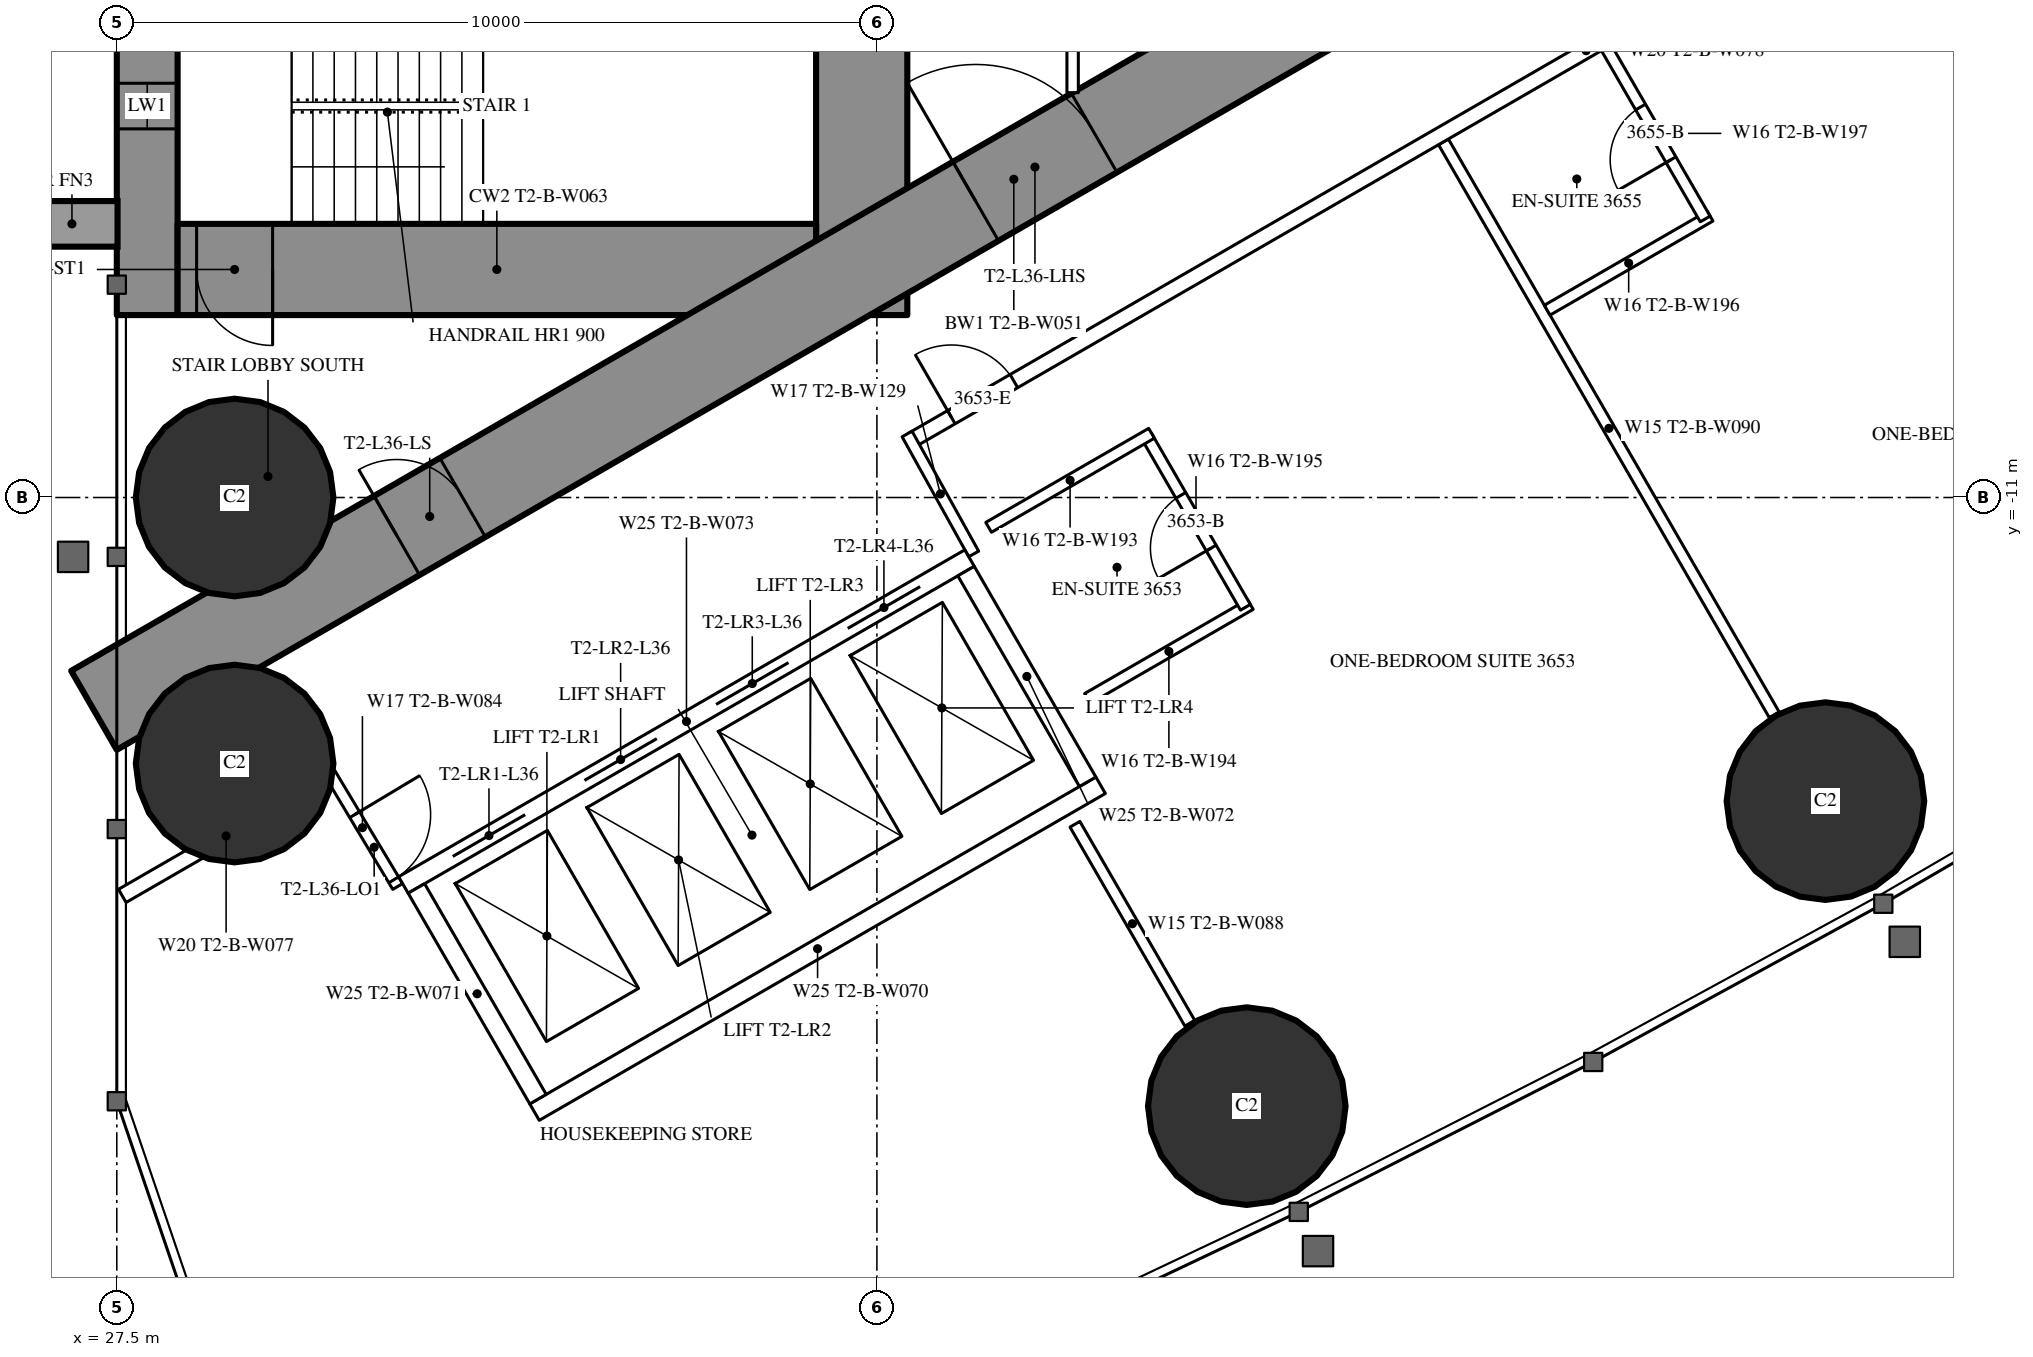
"""IFC4 building model, lengths in metres.
Left out: names, types, materials, properties, quantities, classifications, styles, units other than length and angle.
Written with IfcOpenShell. Run it as: python <this file> out.ifc"""

import sys

from ifc_helpers import new_model, si_unit, direction, frame, frame_2d, origin, origin_2d, place, context, subcontext, project, spatial, rectangle, hollow_circle, extrude, element, fill, save


model = new_model("IFC4")
c1 = context("Model", 3, precision=1e-05, world=origin(), true_north=direction((0.0, 1.0)))
c2 = subcontext(c1, "Body", "Model", "MODEL_VIEW")
j1 = project(units=[si_unit("LENGTHUNIT", "METRE"), si_unit("PLANEANGLEUNIT", "RADIAN")], contexts=[c1])
p1 = place(None, origin())
s1 = spatial("IfcSite", under=j1, at=p1, CompositionType="ELEMENT")
p2 = place(p1, origin())
s2 = spatial("IfcBuilding", under=s1, at=p2, CompositionType="ELEMENT")
p3 = place(p2, frame((0.0, 0.0, 136.1)))
s3 = spatial("IfcBuildingStorey", under=s2, at=p3, CompositionType="ELEMENT", Elevation=136.1)
for number, where, z_axis, x_axis in (
    (1, (29.05, -11.0, 0.0), (0.0, 0.0, 1.0), (1.0, 0.0, 0.0)),
    (2, (29.05, -14.5, 0.0), (0.0, 0.0, 1.0), (1.0, 0.0, 0.0)),
    (3, (42.366, -19.007, 0.0), (0.0, 0.0, 1.0), (1.0, 0.0, 0.0)),
    (4, (49.979, -14.994, 0.0), (0.0, 0.0, 1.0), (1.0, 0.0, 0.0)),
):
    element("IfcColumn", number, at=place(p3, frame(where, z_axis=z_axis, x_axis=x_axis)), inside=s3, PredefinedType="COLUMN", context=c2, shape_type="SweptSolid", body=[
        extrude(hollow_circle(Radius=1.3, WallThickness=0.1, at=origin_2d()), origin(), (0.0, 0.0, 1.0), 3.5),
    ])
p4 = place(p3, frame((27.9, -8.6, 0.0), z_axis=(0.0, 0.0, 1.0), x_axis=(0.0, 1.0, 0.0)))
e5 = element("IfcWall", 5, at=p4, inside=s3, PredefinedType="SHEAR", context=c2, shape_type="SweptSolid", body=[
    extrude(rectangle(XDim=17.2, YDim=0.8, at=frame_2d((8.6, 0.0))), origin(), (0.0, 0.0, 1.0), 3.5),
])
p5 = place(p4, frame((2.45, 0.0, 0.6)))
e6 = element("IfcOpeningElement", 6, at=p5, cuts=e5, PredefinedType="OPENING", context=c2, shape_type="SweptSolid", body=[
    extrude(rectangle(XDim=0.6, YDim=2.1, at=frame_2d((0.3, 1.05))), frame((0.0, 0.41, 0.0), z_axis=(0.0, -1.0, 0.0), x_axis=(1.0, 0.0, 0.0)), (0.0, 0.0, 1.0), 0.82),
])
p6 = place(p4, frame((14.15, 0.0, 0.6)))
e7 = element("IfcOpeningElement", 7, at=p6, cuts=e5, PredefinedType="OPENING", context=c2, shape_type="SweptSolid", body=[
    extrude(rectangle(XDim=0.6, YDim=2.1, at=frame_2d((0.3, 1.05))), frame((0.0, 0.41, 0.0), z_axis=(0.0, -1.0, 0.0), x_axis=(1.0, 0.0, 0.0)), (0.0, 0.0, 1.0), 0.82),
])
p7 = place(p3, frame((37.3, -8.6, 0.0), z_axis=(0.0, 0.0, 1.0), x_axis=(0.0, 1.0, 0.0)))
e8 = element("IfcWall", 8, at=p7, inside=s3, PredefinedType="SHEAR", context=c2, shape_type="SweptSolid", body=[
    extrude(rectangle(XDim=17.2, YDim=1.2, at=frame_2d((8.6, 0.0))), origin(), (0.0, 0.0, 1.0), 3.5),
])
p8 = place(p7, frame((7.7, 0.0, 0.0)))
e9 = element("IfcOpeningElement", 9, at=p8, cuts=e8, PredefinedType="OPENING", context=c2, shape_type="SweptSolid", body=[
    extrude(rectangle(XDim=1.8, YDim=2.2, at=frame_2d((0.9, 1.1))), frame((0.0, 0.61, 0.0), z_axis=(0.0, -1.0, 0.0), x_axis=(1.0, 0.0, 0.0)), (0.0, 0.0, 1.0), 1.22),
])
p9 = place(p3, frame((28.3, -8.0, 0.0), z_axis=(0.0, 0.0, 1.0), x_axis=(1.0, 0.0, 0.0)))
e10 = element("IfcWall", 10, at=p9, inside=s3, PredefinedType="SHEAR", context=c2, shape_type="SweptSolid", body=[
    extrude(rectangle(XDim=8.4, YDim=1.2, at=frame_2d((4.2, 0.0))), origin(), (0.0, 0.0, 1.0), 3.5),
])
p10 = place(p9, frame((0.25, 0.0, 0.0)))
e11 = element("IfcOpeningElement", 11, at=p10, cuts=e10, PredefinedType="OPENING", context=c2, shape_type="SweptSolid", body=[
    extrude(rectangle(XDim=1.0, YDim=2.2, at=frame_2d((0.5, 1.1))), frame((0.0, 0.61, 0.0), z_axis=(0.0, -1.0, 0.0), x_axis=(1.0, 0.0, 0.0)), (0.0, 0.0, 1.0), 1.22),
])
p11 = place(p3, frame((27.2, -13.8, 0.0), z_axis=(0.0, 0.0, 1.0), x_axis=(0.866027159892, 0.499996958321, 0.0)))
e12 = element("IfcWall", 12, at=p11, inside=s3, PredefinedType="SHEAR", context=c2, shape_type="SweptSolid", body=[
    extrude(rectangle(XDim=27.947, YDim=1.2, at=frame_2d((13.973, 0.0))), origin(), (0.0, 0.0, 1.0), 3.5),
])
p12 = place(p11, frame((4.6, 0.0, 0.0)))
e13 = element("IfcOpeningElement", 13, at=p12, cuts=e12, PredefinedType="OPENING", context=c2, shape_type="SweptSolid", body=[
    extrude(rectangle(XDim=1.0, YDim=2.2, at=frame_2d((0.5, 1.1))), frame((0.0, 0.61, 0.0), z_axis=(0.0, -1.0, 0.0), x_axis=(1.0, 0.0, 0.0)), (0.0, 0.0, 1.0), 1.22),
])
p13 = place(p11, frame((13.395, 0.0, 0.0)))
e14 = element("IfcOpeningElement", 14, at=p13, cuts=e12, PredefinedType="OPENING", context=c2, shape_type="SweptSolid", body=[
    extrude(rectangle(XDim=1.8, YDim=2.2, at=frame_2d((0.9, 1.1))), frame((0.0, 0.61, 0.0), z_axis=(0.0, -1.0, 0.0), x_axis=(1.0, 0.0, 0.0)), (0.0, 0.0, 1.0), 1.22),
])
p14 = place(p3, frame((44.954, -6.321, 0.0), z_axis=(0.0, 0.0, 1.0), x_axis=(0.500018676722, -0.866014620505, 0.0)))
e15 = element("IfcWall", 15, at=p14, inside=s3, PredefinedType="PARTITIONING", context=c2, shape_type="SweptSolid", body=[
    extrude(rectangle(XDim=8.704, YDim=0.15, at=frame_2d((4.352, 0.0))), origin(), (0.0, 0.0, 1.0), 2.2),
])
p15 = place(p3, frame((40.105, -15.299, 0.0), z_axis=(0.0, 0.0, 1.0), x_axis=(0.499978822259, -0.866037630414, 0.0)))
e16 = element("IfcWall", 16, at=p15, inside=s3, PredefinedType="PARTITIONING", context=c2, shape_type="SweptSolid", body=[
    extrude(rectangle(XDim=3.023, YDim=0.15, at=frame_2d((1.511, 0.0))), origin(), (0.0, 0.0, 1.0), 3.25),
])
p16 = place(p3, frame((27.572, -16.241, 0.0), z_axis=(0.0, 0.0, 1.0), x_axis=(0.866029654818, 0.499992636921, 0.0)))
e17 = element("IfcWall", 17, at=p16, inside=s3, PredefinedType="PARTITIONING", context=c2, shape_type="SweptSolid", body=[
    extrude(rectangle(XDim=3.155, YDim=0.2, at=frame_2d((1.577, 0.0))), origin(), (0.0, 0.0, 1.0), 3.25),
])
p17 = place(p3, frame((37.96, -10.243, 0.0), z_axis=(0.0, 0.0, 1.0), x_axis=(0.866026429433, 0.499998223521, 0.0)))
e18 = element("IfcWall", 18, at=p17, inside=s3, PredefinedType="PARTITIONING", context=c2, shape_type="SweptSolid", body=[
    extrude(rectangle(XDim=20.487, YDim=0.2, at=frame_2d((10.243, 0.0))), origin(), (0.0, 0.0, 1.0), 3.25),
])
p18 = place(p17, frame((10.743, 0.0, 0.0)))
e19 = element("IfcOpeningElement", 19, at=p18, cuts=e18, PredefinedType="OPENING", context=c2, shape_type="SweptSolid", body=[
    extrude(rectangle(XDim=0.95, YDim=2.2, at=frame_2d((0.475, 1.1))), frame((0.0, 0.11, 0.0), z_axis=(0.0, -1.0, 0.0), x_axis=(1.0, 0.0, 0.0)), (0.0, 0.0, 1.0), 0.22),
])
p19 = place(p17, frame((17.586, 0.0, 0.0)))
e20 = element("IfcOpeningElement", 20, at=p19, cuts=e18, PredefinedType="OPENING", context=c2, shape_type="SweptSolid", body=[
    extrude(rectangle(XDim=1.8, YDim=2.2, at=frame_2d((0.9, 1.1))), frame((0.0, 0.11, 0.0), z_axis=(0.0, -1.0, 0.0), x_axis=(1.0, 0.0, 0.0)), (0.0, 0.0, 1.0), 0.22),
])
p20 = place(p17, frame((0.6, 0.0, 0.0)))
e21 = element("IfcOpeningElement", 21, at=p20, cuts=e18, PredefinedType="OPENING", context=c2, shape_type="SweptSolid", body=[
    extrude(rectangle(XDim=0.95, YDim=2.2, at=frame_2d((0.475, 1.1))), frame((0.0, 0.11, 0.0), z_axis=(0.0, -1.0, 0.0), x_axis=(1.0, 0.0, 0.0)), (0.0, 0.0, 1.0), 0.22),
])
p21 = place(p3, frame((38.773, -11.742, 0.0), z_axis=(0.0, 0.0, 1.0), x_axis=(-0.485528096672, 0.8742210632, 0.0)))
e22 = element("IfcWall", 22, at=p21, inside=s3, PredefinedType="PARTITIONING", context=c2, shape_type="SweptSolid", body=[
    extrude(rectangle(XDim=1.805, YDim=0.15, at=frame_2d((0.903, 0.0))), origin(), (0.0, 0.0, 1.0), 3.25),
])
p22 = place(p3, frame((30.267, -14.569, 0.0), z_axis=(0.0, 0.0, 1.0), x_axis=(0.514336634837, -0.857588377991, 0.0)))
e23 = element("IfcWall", 23, at=p22, inside=s3, PredefinedType="PARTITIONING", context=c2, shape_type="SweptSolid", body=[
    extrude(rectangle(XDim=1.805, YDim=0.15, at=frame_2d((0.903, 0.0))), origin(), (0.0, 0.0, 1.0), 3.25),
])
p23 = place(p22, frame((0.703, 0.0, 0.0)))
e24 = element("IfcOpeningElement", 24, at=p23, cuts=e23, PredefinedType="OPENING", context=c2, shape_type="SweptSolid", body=[
    extrude(rectangle(XDim=1.0, YDim=2.2, at=frame_2d((0.5, 1.1))), frame((0.0, 0.085, 0.0), z_axis=(0.0, -1.0, 0.0), x_axis=(1.0, 0.0, 0.0)), (0.0, 0.0, 1.0), 0.17),
])
p24 = place(p3, frame((46.319, -8.535, 0.0), z_axis=(0.0, 0.0, 1.0), x_axis=(0.866006523861, 0.500032699561, 0.0)))
e25 = element("IfcWall", 25, at=p24, inside=s3, PredefinedType="PARTITIONING", context=c2, shape_type="SweptSolid", body=[
    extrude(rectangle(XDim=2.475, YDim=0.15, at=frame_2d((1.237, 0.0))), origin(), (0.0, 0.0, 1.0), 3.25),
])
p25 = place(p3, frame((47.097, -5.084, 0.0), z_axis=(0.0, 0.0, 1.0), x_axis=(0.500006934395, -0.866021400173, 0.0)))
e26 = element("IfcWall", 26, at=p25, inside=s3, PredefinedType="PARTITIONING", context=c2, shape_type="SweptSolid", body=[
    extrude(rectangle(XDim=2.6, YDim=0.15, at=frame_2d((1.3, 0.0))), origin(), (0.0, 0.0, 1.0), 3.25),
])
p26 = place(p25, frame((0.9, 0.0, 0.0)))
e27 = element("IfcOpeningElement", 27, at=p26, cuts=e26, PredefinedType="OPENING", context=c2, shape_type="SweptSolid", body=[
    extrude(rectangle(XDim=0.8, YDim=2.2, at=frame_2d((0.4, 1.1))), frame((0.0, 0.085, 0.0), z_axis=(0.0, -1.0, 0.0), x_axis=(1.0, 0.0, 0.0)), (0.0, 0.0, 1.0), 0.17),
])
p27 = place(p3, frame((40.27, -13.644, 0.0), z_axis=(0.0, 0.0, 1.0), x_axis=(0.866031185235, 0.4999899861, 0.0)))
e28 = element("IfcWall", 28, at=p27, inside=s3, PredefinedType="PARTITIONING", context=c2, shape_type="SweptSolid", body=[
    extrude(rectangle(XDim=2.475, YDim=0.15, at=frame_2d((1.238, 0.0))), origin(), (0.0, 0.0, 1.0), 3.25),
])
p28 = place(p3, frame((41.048, -10.193, 0.0), z_axis=(0.0, 0.0, 1.0), x_axis=(0.500047596559, -0.865997922154, 0.0)))
e29 = element("IfcWall", 29, at=p28, inside=s3, PredefinedType="PARTITIONING", context=c2, shape_type="SweptSolid", body=[
    extrude(rectangle(XDim=2.6, YDim=0.15, at=frame_2d((1.3, 0.0))), origin(), (0.0, 0.0, 1.0), 3.25),
])
p29 = place(p28, frame((0.9, 0.0, 0.0)))
e30 = element("IfcOpeningElement", 30, at=p29, cuts=e29, PredefinedType="OPENING", context=c2, shape_type="SweptSolid", body=[
    extrude(rectangle(XDim=0.8, YDim=2.2, at=frame_2d((0.4, 1.1))), frame((0.0, 0.085, 0.0), z_axis=(0.0, -1.0, 0.0), x_axis=(1.0, 0.0, 0.0)), (0.0, 0.0, 1.0), 0.17),
])
p30 = place(p3, frame((38.97, -11.393, 0.0), z_axis=(0.0, 0.0, 1.0), x_axis=(0.866031185235, 0.4999899861, 0.0)))
e31 = element("IfcWall", 31, at=p30, inside=s3, PredefinedType="PARTITIONING", context=c2, shape_type="SweptSolid", body=[
    extrude(rectangle(XDim=2.475, YDim=0.15, at=frame_2d((1.238, 0.0))), origin(), (0.0, 0.0, 1.0), 3.25),
])
p31 = place(p3, frame((40.075, -5.674, 0.0), z_axis=(0.0, 0.0, 1.0), x_axis=(0.0, 1.0, 0.0)))
e32 = element("IfcWall", 32, at=p31, inside=s3, PredefinedType="PARTITIONING", context=c2, shape_type="SweptSolid", body=[
    extrude(rectangle(XDim=6.874, YDim=0.15, at=frame_2d((3.437, 0.0))), origin(), (0.0, 0.0, 1.0), 3.25),
])
p32 = place(p31, frame((2.537, 0.0, 0.0)))
e33 = element("IfcOpeningElement", 33, at=p32, cuts=e32, PredefinedType="OPENING", context=c2, shape_type="SweptSolid", body=[
    extrude(rectangle(XDim=1.8, YDim=2.2, at=frame_2d((0.9, 1.1))), frame((0.0, 0.085, 0.0), z_axis=(0.0, -1.0, 0.0), x_axis=(1.0, 0.0, 0.0)), (0.0, 0.0, 1.0), 0.17),
])
p33 = place(p3, frame((31.271, -16.097, 0.0), z_axis=(0.0, 0.0, 1.0), x_axis=(0.86604045752, 0.499973925258, 0.0)))
e34 = element("IfcWall", 34, at=p33, inside=s3, PredefinedType="PARTITIONING", context=c2, shape_type="SweptSolid", body=[
    extrude(rectangle(XDim=8.6, YDim=0.25, at=frame_2d((4.3, 0.0))), origin(), (0.0, 0.0, 1.0), 3.25),
])
p34 = place(p33, frame((0.75, 0.0, 0.0)))
e35 = element("IfcOpeningElement", 35, at=p34, cuts=e34, PredefinedType="OPENING", context=c2, shape_type="SweptSolid", body=[
    extrude(rectangle(XDim=1.1, YDim=2.2, at=frame_2d((0.55, 1.1))), frame((0.0, 0.135, 0.0), z_axis=(0.0, -1.0, 0.0), x_axis=(1.0, 0.0, 0.0)), (0.0, 0.0, 1.0), 0.27),
])
p35 = place(p33, frame((2.75, 0.0, 0.0)))
e36 = element("IfcOpeningElement", 36, at=p35, cuts=e34, PredefinedType="OPENING", context=c2, shape_type="SweptSolid", body=[
    extrude(rectangle(XDim=1.1, YDim=2.2, at=frame_2d((0.55, 1.1))), frame((0.0, 0.135, 0.0), z_axis=(0.0, -1.0, 0.0), x_axis=(1.0, 0.0, 0.0)), (0.0, 0.0, 1.0), 0.27),
])
p36 = place(p33, frame((4.75, 0.0, 0.0)))
e37 = element("IfcOpeningElement", 37, at=p36, cuts=e34, PredefinedType="OPENING", context=c2, shape_type="SweptSolid", body=[
    extrude(rectangle(XDim=1.1, YDim=2.2, at=frame_2d((0.55, 1.1))), frame((0.0, 0.135, 0.0), z_axis=(0.0, -1.0, 0.0), x_axis=(1.0, 0.0, 0.0)), (0.0, 0.0, 1.0), 0.27),
])
p37 = place(p33, frame((6.75, 0.0, 0.0)))
e38 = element("IfcOpeningElement", 38, at=p37, cuts=e34, PredefinedType="OPENING", context=c2, shape_type="SweptSolid", body=[
    extrude(rectangle(XDim=1.1, YDim=2.2, at=frame_2d((0.55, 1.1))), frame((0.0, 0.135, 0.0), z_axis=(0.0, -1.0, 0.0), x_axis=(1.0, 0.0, 0.0)), (0.0, 0.0, 1.0), 0.27),
])
p38 = place(p3, frame((32.996, -19.086, 0.0), z_axis=(0.0, 0.0, 1.0), x_axis=(0.866028165386, 0.499995216735, 0.0)))
e39 = element("IfcWall", 39, at=p38, inside=s3, PredefinedType="PARTITIONING", context=c2, shape_type="SweptSolid", body=[
    extrude(rectangle(XDim=8.6, YDim=0.25, at=frame_2d((4.3, 0.0))), origin(), (0.0, 0.0, 1.0), 3.25),
])
for number, where, z_axis, x_axis in (
    (40, (31.441, -16.143, 0.0), (0.0, 0.0, 1.0), (0.5, -0.866, 0.0)),
    (41, (38.673, -11.968, 0.0), (0.0, 0.0, 1.0), (0.5, -0.866, 0.0)),
):
    element("IfcWall", number, at=place(p3, frame(where, z_axis=z_axis, x_axis=x_axis)), inside=s3, PredefinedType="PARTITIONING", context=c2, shape_type="SweptSolid", body=[
        extrude(rectangle(XDim=3.201, YDim=0.25, at=frame_2d((1.6, 0.0))), origin(), (0.0, 0.0, 1.0), 3.25),
    ])
p39 = place(p26, origin())
e42 = element("IfcDoor", 42, at=p39, inside=s3, OperationType="SINGLE_SWING_RIGHT", PredefinedType="DOOR", context=c2, shape_type="SweptSolid", body=[
    extrude(rectangle(XDim=0.8, YDim=2.2, at=frame_2d((0.4, 1.1))), frame((0.0, 0.025, 0.0), z_axis=(0.0, -1.0, 0.0), x_axis=(1.0, 0.0, 0.0)), (0.0, 0.0, 1.0), 0.05),
])
fill(e27, e42)
p40 = place(p29, origin())
e43 = element("IfcDoor", 43, at=p40, inside=s3, OperationType="SINGLE_SWING_RIGHT", PredefinedType="DOOR", context=c2, shape_type="SweptSolid", body=[
    extrude(rectangle(XDim=0.8, YDim=2.2, at=frame_2d((0.4, 1.1))), frame((0.0, 0.025, 0.0), z_axis=(0.0, -1.0, 0.0), x_axis=(1.0, 0.0, 0.0)), (0.0, 0.0, 1.0), 0.05),
])
fill(e30, e43)
p41 = place(p20, origin())
e44 = element("IfcDoor", 44, at=p41, inside=s3, OperationType="SINGLE_SWING_LEFT", PredefinedType="DOOR", context=c2, shape_type="SweptSolid", body=[
    extrude(rectangle(XDim=0.95, YDim=2.2, at=frame_2d((0.475, 1.1))), frame((0.0, 0.025, 0.0), z_axis=(0.0, -1.0, 0.0), x_axis=(1.0, 0.0, 0.0)), (0.0, 0.0, 1.0), 0.05),
])
fill(e21, e44)
p42 = place(p23, origin())
e45 = element("IfcDoor", 45, at=p42, inside=s3, OperationType="SINGLE_SWING_LEFT", PredefinedType="DOOR", context=c2, shape_type="SweptSolid", body=[
    extrude(rectangle(XDim=1.0, YDim=2.2, at=frame_2d((0.5, 1.1))), frame((0.0, 0.025, 0.0), z_axis=(0.0, -1.0, 0.0), x_axis=(1.0, 0.0, 0.0)), (0.0, 0.0, 1.0), 0.05),
])
fill(e24, e45)
p43 = place(p12, origin())
e46 = element("IfcDoor", 46, at=p43, inside=s3, OperationType="SINGLE_SWING_LEFT", PredefinedType="DOOR", context=c2, shape_type="SweptSolid", body=[
    extrude(rectangle(XDim=1.0, YDim=2.2, at=frame_2d((0.5, 1.1))), frame((0.0, 0.025, 0.0), z_axis=(0.0, -1.0, 0.0), x_axis=(1.0, 0.0, 0.0)), (0.0, 0.0, 1.0), 0.05),
])
fill(e13, e46)
p44 = place(p13, origin())
e47 = element("IfcDoor", 47, at=p44, inside=s3, OperationType="DOUBLE_DOOR_SINGLE_SWING", PredefinedType="DOOR", context=c2, shape_type="SweptSolid", body=[
    extrude(rectangle(XDim=1.8, YDim=2.2, at=frame_2d((0.9, 1.1))), frame((0.0, 0.025, 0.0), z_axis=(0.0, -1.0, 0.0), x_axis=(1.0, 0.0, 0.0)), (0.0, 0.0, 1.0), 0.05),
])
fill(e14, e47)
p45 = place(p10, origin())
e48 = element("IfcDoor", 48, at=p45, inside=s3, OperationType="SINGLE_SWING_RIGHT", PredefinedType="DOOR", context=c2, shape_type="SweptSolid", body=[
    extrude(rectangle(XDim=1.0, YDim=2.2, at=frame_2d((0.5, 1.1))), frame((0.0, 0.025, 0.0), z_axis=(0.0, -1.0, 0.0), x_axis=(1.0, 0.0, 0.0)), (0.0, 0.0, 1.0), 0.05),
])
fill(e11, e48)
p46 = place(p34, origin())
e49 = element("IfcDoor", 49, at=p46, inside=s3, OperationType="DOUBLE_DOOR_SLIDING", PredefinedType="USERDEFINED", context=c2, shape_type="SweptSolid", body=[
    extrude(rectangle(XDim=1.1, YDim=2.2, at=frame_2d((0.55, 1.1))), frame((0.0, 0.025, 0.0), z_axis=(0.0, -1.0, 0.0), x_axis=(1.0, 0.0, 0.0)), (0.0, 0.0, 1.0), 0.05),
])
fill(e35, e49)
p47 = place(p35, origin())
e50 = element("IfcDoor", 50, at=p47, inside=s3, OperationType="DOUBLE_DOOR_SLIDING", PredefinedType="USERDEFINED", context=c2, shape_type="SweptSolid", body=[
    extrude(rectangle(XDim=1.1, YDim=2.2, at=frame_2d((0.55, 1.1))), frame((0.0, 0.025, 0.0), z_axis=(0.0, -1.0, 0.0), x_axis=(1.0, 0.0, 0.0)), (0.0, 0.0, 1.0), 0.05),
])
fill(e36, e50)
p48 = place(p36, origin())
e51 = element("IfcDoor", 51, at=p48, inside=s3, OperationType="DOUBLE_DOOR_SLIDING", PredefinedType="USERDEFINED", context=c2, shape_type="SweptSolid", body=[
    extrude(rectangle(XDim=1.1, YDim=2.2, at=frame_2d((0.55, 1.1))), frame((0.0, 0.025, 0.0), z_axis=(0.0, -1.0, 0.0), x_axis=(1.0, 0.0, 0.0)), (0.0, 0.0, 1.0), 0.05),
])
fill(e37, e51)
p49 = place(p37, origin())
e52 = element("IfcDoor", 52, at=p49, inside=s3, OperationType="DOUBLE_DOOR_SLIDING", PredefinedType="USERDEFINED", context=c2, shape_type="SweptSolid", body=[
    extrude(rectangle(XDim=1.1, YDim=2.2, at=frame_2d((0.55, 1.1))), frame((0.0, 0.025, 0.0), z_axis=(0.0, -1.0, 0.0), x_axis=(1.0, 0.0, 0.0)), (0.0, 0.0, 1.0), 0.05),
])
fill(e38, e52)
p50 = place(p5, origin())
e53 = element("IfcWindow", 53, at=p50, inside=s3, PartitioningType="SINGLE_PANEL", PredefinedType="WINDOW", context=c2, shape_type="SweptSolid", body=[
    extrude(rectangle(XDim=0.6, YDim=2.1, at=frame_2d((0.3, 1.05))), frame((0.0, 0.03, 0.0), z_axis=(0.0, -1.0, 0.0), x_axis=(1.0, 0.0, 0.0)), (0.0, 0.0, 1.0), 0.06),
])
fill(e6, e53)
save(model, sys.argv[1])
